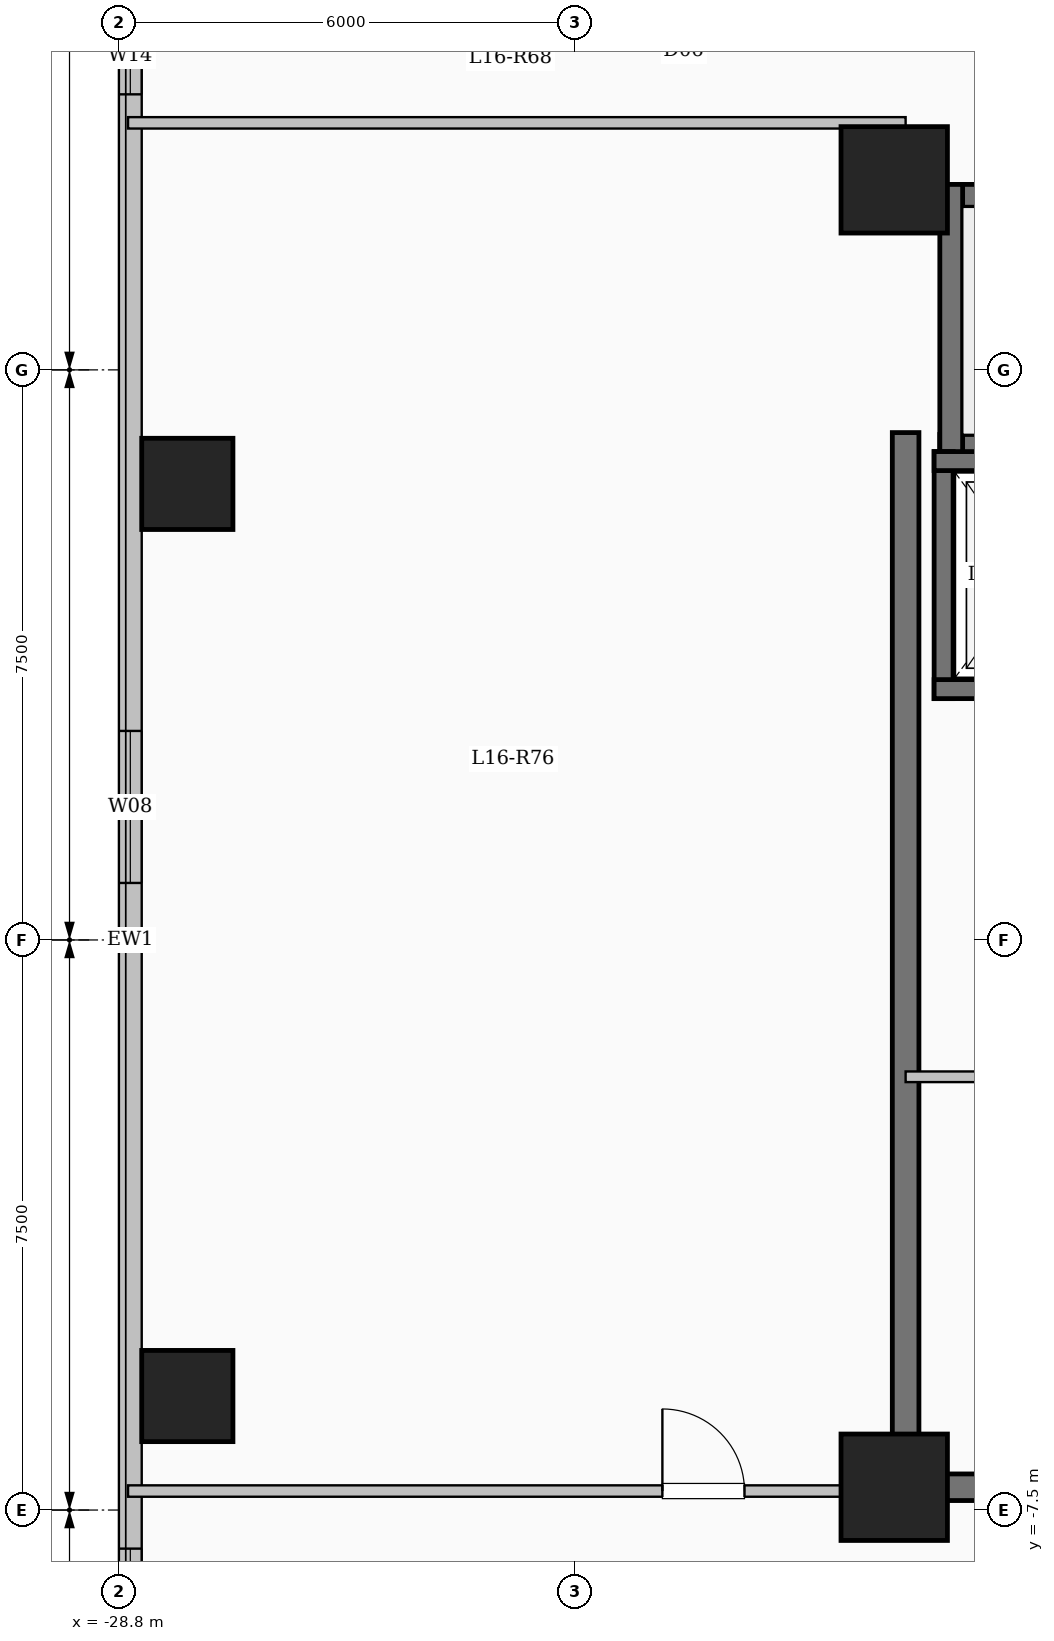
"""IFC4 building model, lengths in metres.
Left out: names, types, materials, properties, quantities, classifications, styles, units other than length and angle.
Written with IfcOpenShell. Run it as: python <this file> out.ifc"""

import sys

from ifc_helpers import new_model, si_unit, direction, frame, frame_2d, origin, origin_2d, place, context, subcontext, project, spatial, rectangle, extrude, element, fill, save


model = new_model("IFC4")
c1 = context("Model", 3, precision=1e-05, world=origin(), true_north=direction((0.0, 1.0)))
c2 = subcontext(c1, "Body", "Model", "MODEL_VIEW")
j1 = project(units=[si_unit("LENGTHUNIT", "METRE"), si_unit("PLANEANGLEUNIT", "RADIAN")], contexts=[c1])
p1 = place(None, origin())
s1 = spatial("IfcSite", under=j1, at=p1, CompositionType="ELEMENT")
p2 = place(p1, origin())
s2 = spatial("IfcBuilding", under=s1, at=p2, CompositionType="ELEMENT")
p3 = place(p2, frame((0.0, 0.0, 60.85)))
s3 = spatial("IfcBuildingStorey", under=s2, at=p3, CompositionType="ELEMENT", Elevation=60.85)
for number, where, z_axis, x_axis in (
    (1, (-18.6, -7.2, 0.0), (0.0, 0.0, 1.0), (1.0, 0.0, 0.0)),
    (2, (-18.6, 10.0, 0.0), (0.0, 0.0, 1.0), (1.0, 0.0, 0.0)),
):
    element("IfcColumn", number, at=place(p3, frame(where, z_axis=z_axis, x_axis=x_axis)), inside=s3, PredefinedType="COLUMN", context=c2, shape_type="SweptSolid", body=[
        extrude(rectangle(XDim=1.4, YDim=1.4, at=origin_2d()), origin(), (0.0, 0.0, 1.0), 3.35),
    ])
for number, where, z_axis, x_axis in (
    (3, (-27.9, -6.0, 0.0), (0.0, 0.0, 1.0), (1.0, 0.0, 0.0)),
    (4, (-27.9, 6.0, 0.0), (0.0, 0.0, 1.0), (1.0, 0.0, 0.0)),
):
    element("IfcColumn", number, at=place(p3, frame(where, z_axis=z_axis, x_axis=x_axis)), inside=s3, PredefinedType="COLUMN", context=c2, shape_type="SweptSolid", body=[
        extrude(rectangle(XDim=1.2, YDim=1.2, at=origin_2d()), origin(), (0.0, 0.0, 1.0), 3.35),
    ])
p4 = place(p3, frame((-28.65, -19.05, 0.0), z_axis=(0.0, 0.0, 1.0), x_axis=(0.0, 1.0, 0.0)))
e5 = element("IfcWall", 5, at=p4, inside=s3, PredefinedType="SOLIDWALL", context=c2, shape_type="SweptSolid", body=[
    extrude(rectangle(XDim=38.1, YDim=0.3, at=frame_2d((19.05, 0.0))), origin(), (0.0, 0.0, 1.0), 3.05),
])
p5 = place(p4, frame((3.15, 0.0, 0.9)))
e6 = element("IfcOpeningElement", 6, at=p5, cuts=e5, PredefinedType="OPENING", context=c2, shape_type="SweptSolid", body=[
    extrude(rectangle(XDim=2.4, YDim=1.8, at=frame_2d((1.2, 0.9))), frame((0.0, 0.16, 0.0), z_axis=(0.0, -1.0, 0.0), x_axis=(1.0, 0.0, 0.0)), (0.0, 0.0, 1.0), 0.32),
])
p6 = place(p4, frame((9.542, 0.0, 0.9)))
e7 = element("IfcOpeningElement", 7, at=p6, cuts=e5, PredefinedType="OPENING", context=c2, shape_type="SweptSolid", body=[
    extrude(rectangle(XDim=1.5, YDim=1.65, at=frame_2d((0.75, 0.825))), frame((0.0, 0.16, 0.0), z_axis=(0.0, -1.0, 0.0), x_axis=(1.0, 0.0, 0.0)), (0.0, 0.0, 1.0), 0.32),
])
p7 = place(p4, frame((19.8, 0.0, 0.9)))
e8 = element("IfcOpeningElement", 8, at=p7, cuts=e5, PredefinedType="OPENING", context=c2, shape_type="SweptSolid", body=[
    extrude(rectangle(XDim=2.0, YDim=1.7, at=frame_2d((1.0, 0.85))), frame((0.0, 0.16, 0.0), z_axis=(0.0, -1.0, 0.0), x_axis=(1.0, 0.0, 0.0)), (0.0, 0.0, 1.0), 0.32),
])
p8 = place(p4, frame((30.175, 0.0, 0.95)))
e9 = element("IfcOpeningElement", 9, at=p8, cuts=e5, PredefinedType="OPENING", context=c2, shape_type="SweptSolid", body=[
    extrude(rectangle(XDim=1.0, YDim=1.5, at=frame_2d((0.5, 0.75))), frame((0.0, 0.16, 0.0), z_axis=(0.0, -1.0, 0.0), x_axis=(1.0, 0.0, 0.0)), (0.0, 0.0, 1.0), 0.32),
])
p9 = place(p4, frame((33.85, 0.0, 0.9)))
e10 = element("IfcOpeningElement", 10, at=p9, cuts=e5, PredefinedType="OPENING", context=c2, shape_type="SweptSolid", body=[
    extrude(rectangle(XDim=2.0, YDim=1.7, at=frame_2d((1.0, 0.85))), frame((0.0, 0.16, 0.0), z_axis=(0.0, -1.0, 0.0), x_axis=(1.0, 0.0, 0.0)), (0.0, 0.0, 1.0), 0.32),
])
p10 = place(p3, frame((-18.0, 9.79, 0.0), z_axis=(0.0, 0.0, 1.0), x_axis=(1.0, 0.0, 0.0)))
e11 = element("IfcWall", 11, at=p10, inside=s3, PredefinedType="SHEAR", context=c2, shape_type="SweptSolid", body=[
    extrude(rectangle(XDim=8.0, YDim=0.3, at=frame_2d((4.0, 0.0))), origin(), (0.0, 0.0, 1.0), 3.35),
])
p11 = place(p3, frame((-18.0, 6.5, 0.0), z_axis=(0.0, 0.0, 1.0), x_axis=(1.0, 0.0, 0.0)))
e12 = element("IfcWall", 12, at=p11, inside=s3, PredefinedType="SHEAR", context=c2, shape_type="SweptSolid", body=[
    extrude(rectangle(XDim=8.0, YDim=0.3, at=frame_2d((4.0, 0.0))), origin(), (0.0, 0.0, 1.0), 3.35),
])
p12 = place(p11, frame((6.45, 0.0, 0.0)))
e13 = element("IfcOpeningElement", 13, at=p12, cuts=e12, PredefinedType="OPENING", context=c2, shape_type="SweptSolid", body=[
    extrude(rectangle(XDim=1.0, YDim=2.15, at=frame_2d((0.5, 1.075))), frame((0.0, 0.16, 0.0), z_axis=(0.0, -1.0, 0.0), x_axis=(1.0, 0.0, 0.0)), (0.0, 0.0, 1.0), 0.32),
])
p13 = place(p3, frame((-17.85, 6.35, 0.0), z_axis=(0.0, 0.0, 1.0), x_axis=(0.0, 1.0, 0.0)))
e14 = element("IfcWall", 14, at=p13, inside=s3, PredefinedType="SHEAR", context=c2, shape_type="SweptSolid", body=[
    extrude(rectangle(XDim=3.59, YDim=0.3, at=frame_2d((1.795, 0.0))), origin(), (0.0, 0.0, 1.0), 3.35),
])
p14 = place(p3, frame((-17.95, 3.175, 0.0), z_axis=(0.0, 0.0, 1.0), x_axis=(0.0, 1.0, 0.0)))
e15 = element("IfcWall", 15, at=p14, inside=s3, PredefinedType="SHEAR", context=c2, shape_type="SweptSolid", body=[
    extrude(rectangle(XDim=3.25, YDim=0.25, at=frame_2d((1.625, 0.0))), origin(), (0.0, 0.0, 1.0), 3.35),
])
for number, where, z_axis, x_axis in (
    (16, (-18.075, 3.3, 0.0), (0.0, 0.0, 1.0), (1.0, 0.0, 0.0)),
    (17, (-18.075, 6.3, 0.0), (0.0, 0.0, 1.0), (1.0, 0.0, 0.0)),
):
    element("IfcWall", number, at=place(p3, frame(where, z_axis=z_axis, x_axis=x_axis)), inside=s3, PredefinedType="SHEAR", context=c2, shape_type="SweptSolid", body=[
        extrude(rectangle(XDim=2.55, YDim=0.25, at=frame_2d((1.275, 0.0))), origin(), (0.0, 0.0, 1.0), 3.35),
    ])
p15 = place(p3, frame((-18.45, -7.375, 0.0), z_axis=(0.0, 0.0, 1.0), x_axis=(0.0, 1.0, 0.0)))
e18 = element("IfcWall", 18, at=p15, inside=s3, PredefinedType="SHEAR", context=c2, shape_type="SweptSolid", body=[
    extrude(rectangle(XDim=14.05, YDim=0.35, at=frame_2d((7.025, 0.0))), origin(), (0.0, 0.0, 1.0), 3.35),
])
p16 = place(p3, frame((-18.625, -7.2, 0.0), z_axis=(0.0, 0.0, 1.0), x_axis=(1.0, 0.0, 0.0)))
e19 = element("IfcWall", 19, at=p16, inside=s3, PredefinedType="SHEAR", context=c2, shape_type="SweptSolid", body=[
    extrude(rectangle(XDim=8.55, YDim=0.35, at=frame_2d((4.275, 0.0))), origin(), (0.0, 0.0, 1.0), 3.35),
])
p17 = place(p3, frame((-18.45, -1.8, 0.0), z_axis=(0.0, 0.0, 1.0), x_axis=(1.0, 0.0, 0.0)))
e20 = element("IfcWall", 20, at=p17, inside=s3, PredefinedType="PARTITIONING", context=c2, shape_type="SweptSolid", body=[
    extrude(rectangle(XDim=3.05, YDim=0.14, at=frame_2d((1.525, 0.0))), origin(), (0.0, 0.0, 1.0), 3.05),
])
p18 = place(p17, frame((1.05, 0.0, 0.0)))
e21 = element("IfcOpeningElement", 21, at=p18, cuts=e20, PredefinedType="OPENING", context=c2, shape_type="SweptSolid", body=[
    extrude(rectangle(XDim=0.9, YDim=2.08, at=frame_2d((0.45, 1.04))), frame((0.0, 0.08, 0.0), z_axis=(0.0, -1.0, 0.0), x_axis=(1.0, 0.0, 0.0)), (0.0, 0.0, 1.0), 0.16),
])
p19 = place(p3, frame((-28.68, -7.25, 0.0), z_axis=(0.0, 0.0, 1.0), x_axis=(1.0, 0.0, 0.0)))
e22 = element("IfcWall", 22, at=p19, inside=s3, PredefinedType="PARTITIONING", context=c2, shape_type="SweptSolid", body=[
    extrude(rectangle(XDim=10.23, YDim=0.15, at=frame_2d((5.115, 0.0))), origin(), (0.0, 0.0, 1.0), 3.05),
])
p20 = place(p19, frame((7.03, 0.0, 0.0)))
e23 = element("IfcOpeningElement", 23, at=p20, cuts=e22, PredefinedType="OPENING", context=c2, shape_type="SweptSolid", body=[
    extrude(rectangle(XDim=1.08, YDim=2.15, at=frame_2d((0.54, 1.075))), frame((0.0, 0.085, 0.0), z_axis=(0.0, -1.0, 0.0), x_axis=(1.0, 0.0, 0.0)), (0.0, 0.0, 1.0), 0.17),
])
p21 = place(p3, frame((-28.68, 10.75, 0.0), z_axis=(0.0, 0.0, 1.0), x_axis=(1.0, 0.0, 0.0)))
e24 = element("IfcWall", 24, at=p21, inside=s3, PredefinedType="PARTITIONING", context=c2, shape_type="SweptSolid", body=[
    extrude(rectangle(XDim=10.23, YDim=0.15, at=frame_2d((5.115, 0.0))), origin(), (0.0, 0.0, 1.0), 3.05),
])
p22 = place(p6, origin())
e25 = element("IfcWindow", 25, at=p22, inside=s3, PartitioningType="SINGLE_PANEL", PredefinedType="WINDOW", context=c2, shape_type="SweptSolid", body=[
    extrude(rectangle(XDim=1.5, YDim=1.65, at=frame_2d((0.75, 0.825))), frame((0.0, 0.03, 0.0), z_axis=(0.0, -1.0, 0.0), x_axis=(1.0, 0.0, 0.0)), (0.0, 0.0, 1.0), 0.06),
])
fill(e7, e25)
p23 = place(p7, origin())
e26 = element("IfcWindow", 26, at=p23, inside=s3, PartitioningType="SINGLE_PANEL", PredefinedType="WINDOW", context=c2, shape_type="SweptSolid", body=[
    extrude(rectangle(XDim=2.0, YDim=1.7, at=frame_2d((1.0, 0.85))), frame((0.0, 0.03, 0.0), z_axis=(0.0, -1.0, 0.0), x_axis=(1.0, 0.0, 0.0)), (0.0, 0.0, 1.0), 0.06),
])
fill(e8, e26)
p24 = place(p8, origin())
e27 = element("IfcWindow", 27, at=p24, inside=s3, PartitioningType="SINGLE_PANEL", PredefinedType="WINDOW", context=c2, shape_type="SweptSolid", body=[
    extrude(rectangle(XDim=1.0, YDim=1.5, at=frame_2d((0.5, 0.75))), frame((0.0, 0.03, 0.0), z_axis=(0.0, -1.0, 0.0), x_axis=(1.0, 0.0, 0.0)), (0.0, 0.0, 1.0), 0.06),
])
fill(e9, e27)
p25 = place(p20, origin())
e28 = element("IfcDoor", 28, at=p25, inside=s3, OperationType="SINGLE_SWING_LEFT", PredefinedType="DOOR", context=c2, shape_type="SweptSolid", body=[
    extrude(rectangle(XDim=1.08, YDim=2.15, at=frame_2d((0.54, 1.075))), frame((0.0, 0.025, 0.0), z_axis=(0.0, -1.0, 0.0), x_axis=(1.0, 0.0, 0.0)), (0.0, 0.0, 1.0), 0.05),
])
fill(e23, e28)
save(model, sys.argv[1])
